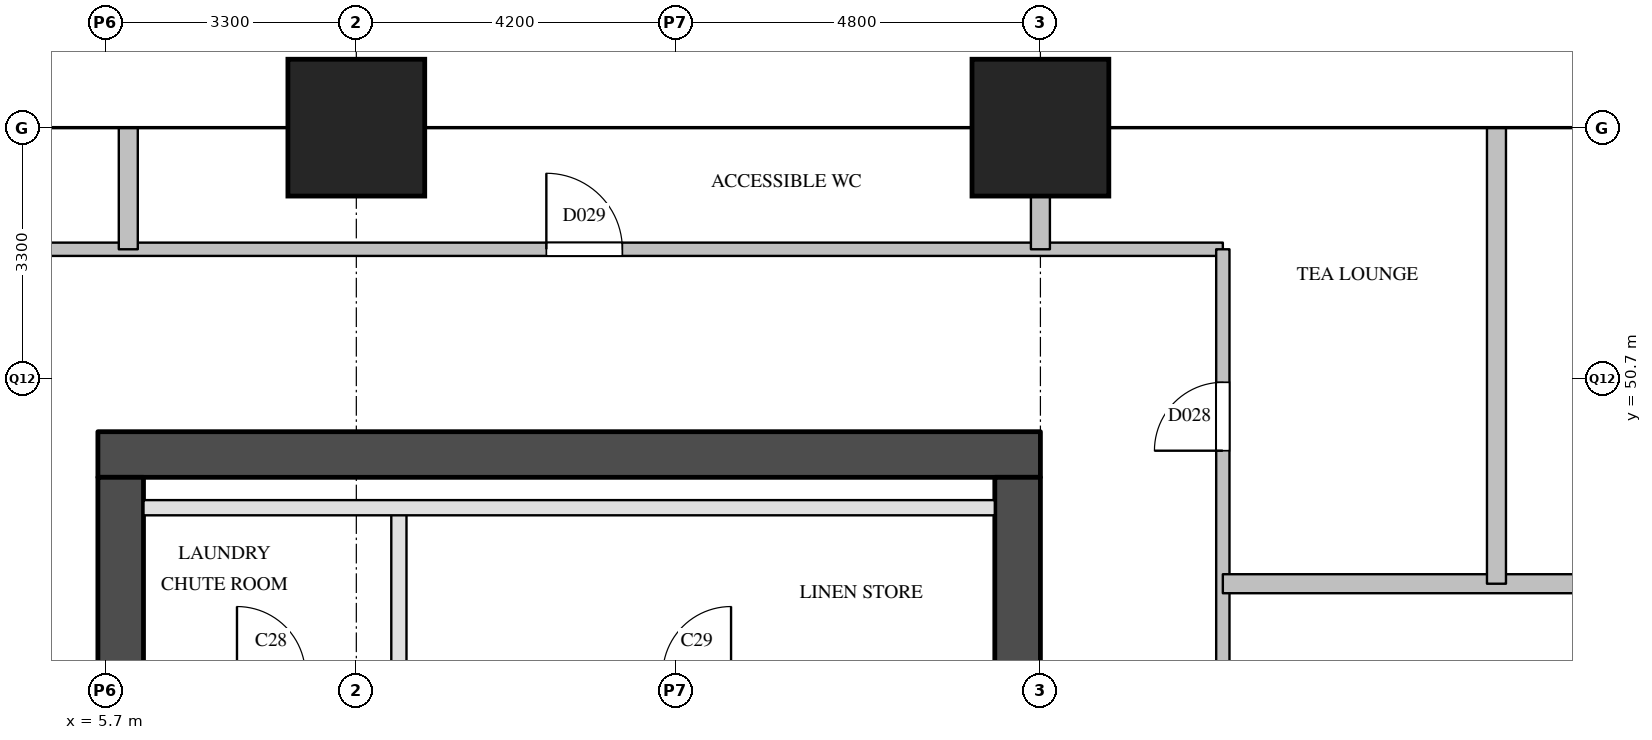
"""IFC4 building model, lengths in metres.
Left out: names, types, materials, properties, quantities, classifications, styles, units other than length and angle.
Written with IfcOpenShell. Run it as: python <this file> out.ifc"""

import sys

from ifc_helpers import new_model, si_unit, direction, frame, frame_2d, origin, origin_2d, place, context, subcontext, project, spatial, rectangle, extrude, element, fill, save


model = new_model("IFC4")
c1 = context("Model", 3, precision=1e-05, world=origin(), true_north=direction((0.0, 1.0)))
c2 = subcontext(c1, "Body", "Model", "MODEL_VIEW")
j1 = project(units=[si_unit("LENGTHUNIT", "METRE"), si_unit("PLANEANGLEUNIT", "RADIAN")], contexts=[c1])
p1 = place(None, origin())
s1 = spatial("IfcSite", under=j1, at=p1, CompositionType="ELEMENT")
p2 = place(p1, origin())
s2 = spatial("IfcBuilding", under=s1, at=p2, CompositionType="ELEMENT")
p3 = place(p2, frame((0.0, 0.0, 65.2)))
s3 = spatial("IfcBuildingStorey", under=s2, at=p3, CompositionType="ELEMENT", Elevation=65.2)
for number, where, z_axis, x_axis in (
    (1, (9.0, 54.0, 0.0), (0.0, 0.0, 1.0), (1.0, 0.0, 0.0)),
    (2, (18.0, 54.0, 0.0), (0.0, 0.0, 1.0), (1.0, 0.0, 0.0)),
):
    element("IfcColumn", number, at=place(p3, frame(where, z_axis=z_axis, x_axis=x_axis)), inside=s3, PredefinedType="COLUMN", context=c2, shape_type="SweptSolid", body=[
        extrude(rectangle(XDim=1.8, YDim=1.8, at=origin_2d()), origin(), (0.0, 0.0, 1.0), 3.8),
    ])
p4 = place(p3, frame((5.6, 49.7, 0.0), z_axis=(0.0, 0.0, 1.0), x_axis=(1.0, 0.0, 0.0)))
e3 = element("IfcWall", 3, at=p4, inside=s3, PredefinedType="SHEAR", context=c2, shape_type="SweptSolid", body=[
    extrude(rectangle(XDim=12.4, YDim=0.6, at=frame_2d((6.2, 0.0))), origin(), (0.0, 0.0, 1.0), 3.5),
])
p5 = place(p3, frame((5.9, 29.1, 0.0), z_axis=(0.0, 0.0, 1.0), x_axis=(0.0, 1.0, 0.0)))
e4 = element("IfcWall", 4, at=p5, inside=s3, PredefinedType="SHEAR", context=c2, shape_type="SweptSolid", body=[
    extrude(rectangle(XDim=20.3, YDim=0.6, at=frame_2d((10.15, 0.0))), origin(), (0.0, 0.0, 1.0), 3.5),
])
p6 = place(p5, frame((3.6, 0.0, 0.0)))
e5 = element("IfcOpeningElement", 5, at=p6, cuts=e4, PredefinedType="OPENING", context=c2, shape_type="SweptSolid", body=[
    extrude(rectangle(XDim=1.8, YDim=2.1, at=frame_2d((0.9, 1.05))), frame((0.0, 0.31, 0.0), z_axis=(0.0, -1.0, 0.0), x_axis=(1.0, 0.0, 0.0)), (0.0, 0.0, 1.0), 0.62),
])
p7 = place(p5, frame((16.4, 0.0, 0.0)))
e6 = element("IfcOpeningElement", 6, at=p7, cuts=e4, PredefinedType="OPENING", context=c2, shape_type="SweptSolid", body=[
    extrude(rectangle(XDim=1.0, YDim=2.1, at=frame_2d((0.5, 1.05))), frame((0.0, 0.31, 0.0), z_axis=(0.0, -1.0, 0.0), x_axis=(1.0, 0.0, 0.0)), (0.0, 0.0, 1.0), 0.62),
])
p8 = place(p3, frame((17.7, 29.1, 0.0), z_axis=(0.0, 0.0, 1.0), x_axis=(0.0, 1.0, 0.0)))
e7 = element("IfcWall", 7, at=p8, inside=s3, PredefinedType="SHEAR", context=c2, shape_type="SweptSolid", body=[
    extrude(rectangle(XDim=20.3, YDim=0.6, at=frame_2d((10.15, 0.0))), origin(), (0.0, 0.0, 1.0), 3.5),
])
p9 = place(p8, frame((1.25, 0.0, 0.0)))
e8 = element("IfcOpeningElement", 8, at=p9, cuts=e7, PredefinedType="OPENING", context=c2, shape_type="SweptSolid", body=[
    extrude(rectangle(XDim=0.7, YDim=2.1, at=frame_2d((0.35, 1.05))), frame((0.0, 0.31, 0.0), z_axis=(0.0, -1.0, 0.0), x_axis=(1.0, 0.0, 0.0)), (0.0, 0.0, 1.0), 0.62),
])
p10 = place(p8, frame((7.05, 0.0, 0.0)))
e9 = element("IfcOpeningElement", 9, at=p10, cuts=e7, PredefinedType="OPENING", context=c2, shape_type="SweptSolid", body=[
    extrude(rectangle(XDim=0.7, YDim=2.1, at=frame_2d((0.35, 1.05))), frame((0.0, 0.31, 0.0), z_axis=(0.0, -1.0, 0.0), x_axis=(1.0, 0.0, 0.0)), (0.0, 0.0, 1.0), 0.62),
])
p11 = place(p3, frame((9.56, 46.8, 0.0), z_axis=(0.0, 0.0, 1.0), x_axis=(0.0, 1.0, 0.0)))
e10 = element("IfcWall", 10, at=p11, inside=s3, PredefinedType="PARTITIONING", context=c2, shape_type="SweptSolid", body=[
    extrude(rectangle(XDim=2.2, YDim=0.2, at=frame_2d((1.1, 0.0))), origin(), (0.0, 0.0, 1.0), 3.5),
])
p12 = place(p3, frame((6.2, 49.0, 0.0), z_axis=(0.0, 0.0, 1.0), x_axis=(1.0, 0.0, 0.0)))
e11 = element("IfcWall", 11, at=p12, inside=s3, PredefinedType="PARTITIONING", context=c2, shape_type="SweptSolid", body=[
    extrude(rectangle(XDim=11.2, YDim=0.2, at=frame_2d((5.6, 0.0))), origin(), (0.0, 0.0, 1.0), 3.5),
])
p13 = place(p3, frame((3.2, 52.4, 0.0), z_axis=(0.0, 0.0, 1.0), x_axis=(1.0, 0.0, 0.0)))
e12 = element("IfcWall", 12, at=p13, inside=s3, PredefinedType="PARTITIONING", context=c2, shape_type="SweptSolid", body=[
    extrude(rectangle(XDim=17.2, YDim=0.175, at=frame_2d((8.6, 0.0))), origin(), (0.0, 0.0, 1.0), 3.5),
])
p14 = place(p13, frame((8.3, 0.0, 0.0)))
e13 = element("IfcOpeningElement", 13, at=p14, cuts=e12, PredefinedType="OPENING", context=c2, shape_type="SweptSolid", body=[
    extrude(rectangle(XDim=1.0, YDim=2.1, at=frame_2d((0.5, 1.05))), frame((0.0, 0.097, 0.0), z_axis=(0.0, -1.0, 0.0), x_axis=(1.0, 0.0, 0.0)), (0.0, 0.0, 1.0), 0.195),
])
p15 = place(p3, frame((20.4, 26.1, 0.0), z_axis=(0.0, 0.0, 1.0), x_axis=(0.0, 1.0, 0.0)))
e14 = element("IfcWall", 14, at=p15, inside=s3, PredefinedType="PARTITIONING", context=c2, shape_type="SweptSolid", body=[
    extrude(rectangle(XDim=26.3, YDim=0.175, at=frame_2d((13.15, 0.0))), origin(), (0.0, 0.0, 1.0), 2.5),
])
p16 = place(p15, frame((4.5, 0.0, 0.0)))
e15 = element("IfcOpeningElement", 15, at=p16, cuts=e14, PredefinedType="OPENING", context=c2, shape_type="SweptSolid", body=[
    extrude(rectangle(XDim=0.9, YDim=2.1, at=frame_2d((0.45, 1.05))), frame((0.0, 0.097, 0.0), z_axis=(0.0, -1.0, 0.0), x_axis=(1.0, 0.0, 0.0)), (0.0, 0.0, 1.0), 0.195),
])
p17 = place(p15, frame((15.45, 0.0, 0.0)))
e16 = element("IfcOpeningElement", 16, at=p17, cuts=e14, PredefinedType="OPENING", context=c2, shape_type="SweptSolid", body=[
    extrude(rectangle(XDim=0.9, YDim=2.1, at=frame_2d((0.45, 1.05))), frame((0.0, 0.097, 0.0), z_axis=(0.0, -1.0, 0.0), x_axis=(1.0, 0.0, 0.0)), (0.0, 0.0, 1.0), 0.195),
])
p18 = place(p15, frame((23.65, 0.0, 0.0)))
e17 = element("IfcOpeningElement", 17, at=p18, cuts=e14, PredefinedType="OPENING", context=c2, shape_type="SweptSolid", body=[
    extrude(rectangle(XDim=0.9, YDim=2.1, at=frame_2d((0.45, 1.05))), frame((0.0, 0.097, 0.0), z_axis=(0.0, -1.0, 0.0), x_axis=(1.0, 0.0, 0.0)), (0.0, 0.0, 1.0), 0.195),
])
p19 = place(p3, frame((20.4, 48.0, 0.0), z_axis=(0.0, 0.0, 1.0), x_axis=(1.0, 0.0, 0.0)))
e18 = element("IfcWall", 18, at=p19, inside=s3, PredefinedType="PARTITIONING", context=c2, shape_type="SweptSolid", body=[
    extrude(rectangle(XDim=13.2, YDim=0.25, at=frame_2d((6.6, 0.0))), origin(), (0.0, 0.0, 1.0), 2.5),
])
p20 = place(p3, frame((6.0, 52.4, 0.0), z_axis=(0.0, 0.0, 1.0), x_axis=(0.0, 1.0, 0.0)))
e19 = element("IfcWall", 19, at=p20, inside=s3, PredefinedType="PARTITIONING", context=c2, shape_type="SweptSolid", body=[
    extrude(rectangle(XDim=1.6, YDim=0.25, at=frame_2d((0.8, 0.0))), origin(), (0.0, 0.0, 1.0), 2.5),
])
p21 = place(p3, frame((18.0, 52.4, 0.0), z_axis=(0.0, 0.0, 1.0), x_axis=(0.0, 1.0, 0.0)))
e20 = element("IfcWall", 20, at=p21, inside=s3, PredefinedType="PARTITIONING", context=c2, shape_type="SweptSolid", body=[
    extrude(rectangle(XDim=1.6, YDim=0.25, at=frame_2d((0.8, 0.0))), origin(), (0.0, 0.0, 1.0), 3.5),
])
p22 = place(p3, frame((24.0, 48.0, 0.0), z_axis=(0.0, 0.0, 1.0), x_axis=(0.0, 1.0, 0.0)))
e21 = element("IfcWall", 21, at=p22, inside=s3, PredefinedType="PARTITIONING", context=c2, shape_type="SweptSolid", body=[
    extrude(rectangle(XDim=6.0, YDim=0.25, at=frame_2d((3.0, 0.0))), origin(), (0.0, 0.0, 1.0), 2.5),
])
p23 = place(p18, origin())
e22 = element("IfcDoor", 22, at=p23, inside=s3, OperationType="SINGLE_SWING_LEFT", PredefinedType="DOOR", context=c2, shape_type="SweptSolid", body=[
    extrude(rectangle(XDim=0.9, YDim=2.1, at=frame_2d((0.45, 1.05))), frame((0.0, 0.025, 0.0), z_axis=(0.0, -1.0, 0.0), x_axis=(1.0, 0.0, 0.0)), (0.0, 0.0, 1.0), 0.05),
])
fill(e17, e22)
p24 = place(p14, origin())
e23 = element("IfcDoor", 23, at=p24, inside=s3, OperationType="SINGLE_SWING_LEFT", PredefinedType="DOOR", context=c2, shape_type="SweptSolid", body=[
    extrude(rectangle(XDim=1.0, YDim=2.1, at=frame_2d((0.5, 1.05))), frame((0.0, 0.025, 0.0), z_axis=(0.0, -1.0, 0.0), x_axis=(1.0, 0.0, 0.0)), (0.0, 0.0, 1.0), 0.05),
])
fill(e13, e23)
save(model, sys.argv[1])
